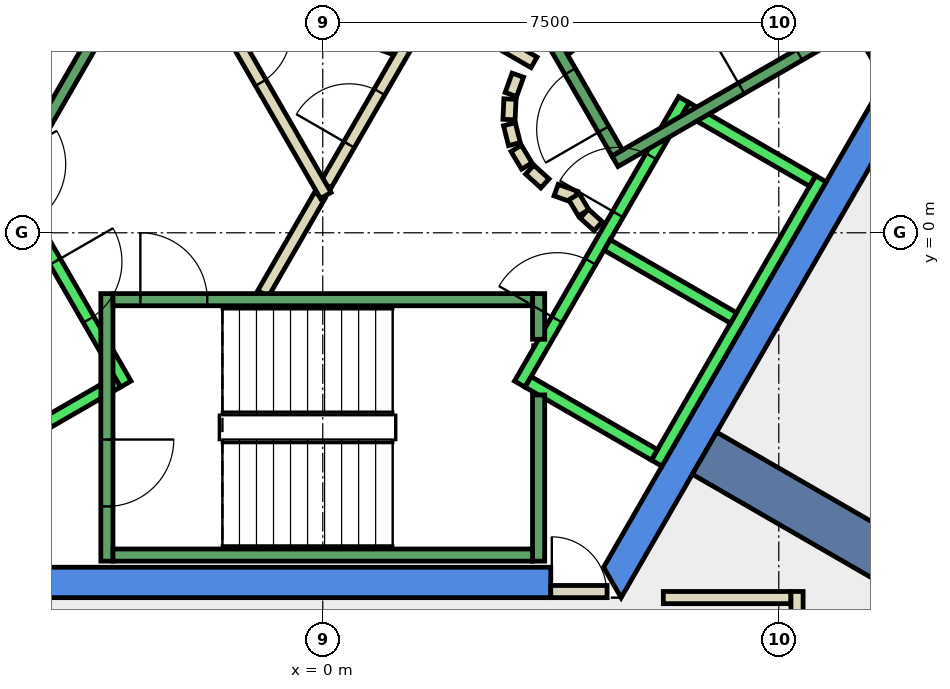
"""IFC4 building model, lengths in metres.
Left out: names, types, materials, properties, quantities, classifications, styles, units other than length and angle.
Written with IfcOpenShell. Run it as: python <this file> out.ifc"""

import sys

from ifc_helpers import new_model, si_unit, direction, frame, frame_2d, origin, place, context, subcontext, project, spatial, polyline, rectangle, outline, extrude, element, fill, save


model = new_model("IFC4")
c1 = context("Model", 3, precision=1e-05, world=origin(), true_north=direction((0.0, 1.0)))
c2 = subcontext(c1, "Body", "Model", "MODEL_VIEW")
j1 = project(units=[si_unit("LENGTHUNIT", "METRE"), si_unit("PLANEANGLEUNIT", "RADIAN")], contexts=[c1])
p1 = place(None, origin())
s1 = spatial("IfcSite", under=j1, at=p1, CompositionType="ELEMENT")
p2 = place(p1, origin())
s2 = spatial("IfcBuilding", under=s1, at=p2, CompositionType="ELEMENT")
p3 = place(p2, frame((0.0, 0.0, 318.8)))
s3 = spatial("IfcBuildingStorey", under=s2, at=p3, CompositionType="ELEMENT", Elevation=318.8)
p4 = place(p3, frame((0.0, 0.0, -0.34)))
e1 = element("IfcWall", 1, at=p4, inside=s3, PredefinedType="SHEAR", context=c2, shape_type="SweptSolid", body=[
    extrude(outline(polyline([(5.486, 9.998), (5.053, 9.748), (9.238, 2.5), (9.815, 2.5), (5.486, 9.998)])), origin(), (0.0, 0.0, 1.0), 3.6),
])
p5 = place(p3, frame((0.0, 0.0, -0.34)))
e2 = element("IfcWall", 2, at=p5, inside=s3, PredefinedType="SHEAR", context=c2, shape_type="SweptSolid", body=[
    extrude(outline(polyline([(3.75, -6.0), (3.75, -5.5), (-4.619, -5.5), (-4.907, -6.0), (3.75, -6.0)])), origin(), (0.0, 0.0, 1.0), 3.6),
])
p6 = place(p3, frame((0.0, 0.0, -0.34)))
e3 = element("IfcWall", 3, at=p6, inside=s3, PredefinedType="SHEAR", context=c2, shape_type="SweptSolid", body=[
    extrude(outline(polyline([(4.907, -6.0), (9.815, 2.5), (9.238, 2.5), (4.619, -5.5), (4.907, -6.0)])), origin(), (0.0, 0.0, 1.0), 3.6),
])
p7 = place(p3, frame((6.279, -3.625, -0.34), z_axis=(0.0, 0.0, 1.0), x_axis=(0.866017533419, -0.500013631625, 0.0)))
e4 = element("IfcWall", 4, at=p7, inside=s3, PredefinedType="SHEAR", context=c2, shape_type="SweptSolid", body=[
    extrude(rectangle(XDim=9.0, YDim=0.8, at=frame_2d((4.5, 0.0))), origin(), (0.0, 0.0, 1.0), 3.6),
])
p8 = place(p3, frame((-0.82, 3.756, 0.0), z_axis=(0.0, 0.0, 1.0), x_axis=(0.939740098492, -0.34188967122, 0.0)))
e5 = element("IfcWall", 5, at=p8, inside=s3, PredefinedType="PARTITIONING", context=c2, shape_type="SweptSolid", body=[
    extrude(rectangle(XDim=2.273, YDim=0.2, at=frame_2d((1.136, 0.0))), origin(), (0.0, 0.0, 1.0), 3.26),
])
p9 = place(p3, frame((-0.982, -1.0, 0.0), z_axis=(0.0, 0.0, 1.0), x_axis=(0.50024047865, 0.865886518847, 0.0)))
e6 = element("IfcWall", 6, at=p9, inside=s3, PredefinedType="PARTITIONING", context=c2, shape_type="SweptSolid", body=[
    extrude(rectangle(XDim=1.863, YDim=0.2, at=frame_2d((0.931, 0.0))), origin(), (0.0, 0.0, 1.0), 3.26),
])
p10 = place(p3, frame((0.05, 0.787, 0.0), z_axis=(0.0, 0.0, 1.0), x_axis=(0.500070457302, 0.865984721421, 0.0)))
e7 = element("IfcWall", 7, at=p10, inside=s3, PredefinedType="PARTITIONING", context=c2, shape_type="SweptSolid", body=[
    extrude(rectangle(XDim=2.631, YDim=0.2, at=frame_2d((1.316, 0.0))), origin(), (0.0, 0.0, 1.0), 3.26),
])
p11 = place(p10, frame((0.766, 0.0, 0.0)))
e8 = element("IfcOpeningElement", 8, at=p11, cuts=e7, PredefinedType="OPENING", context=c2, shape_type="SweptSolid", body=[
    extrude(rectangle(XDim=1.0, YDim=2.1, at=frame_2d((0.5, 1.05))), frame((0.0, 0.11, 0.0), z_axis=(0.0, -1.0, 0.0), x_axis=(1.0, 0.0, 0.0)), (0.0, 0.0, 1.0), 0.22),
])
p12 = place(p3, frame((1.751, 3.798, 0.0), z_axis=(0.0, 0.0, 1.0), x_axis=(0.866091650241, -0.499885240213, 0.0)))
e9 = element("IfcWall", 9, at=p12, inside=s3, PredefinedType="PARTITIONING", context=c2, shape_type="SweptSolid", body=[
    extrude(rectangle(XDim=1.991, YDim=0.2, at=frame_2d((0.995, 0.0))), origin(), (0.0, 0.0, 1.0), 3.26),
])
p13 = place(p3, frame((3.208, 2.592, 0.0), z_axis=(0.0, 0.0, 1.0), x_axis=(-0.337388820924, -0.941365382578, 0.0)))
e10 = element("IfcWall", 10, at=p13, inside=s3, PredefinedType="PARTITIONING", context=c2, shape_type="SweptSolid", body=[
    extrude(rectangle(XDim=0.338, YDim=0.2, at=frame_2d((0.169, 0.0))), origin(), (0.0, 0.0, 1.0), 3.26),
])
p14 = place(p3, frame((3.079, 2.199, 0.0), z_axis=(0.0, 0.0, 1.0), x_axis=(-0.047771483479, -0.998858290933, 0.0)))
e11 = element("IfcWall", 11, at=p14, inside=s3, PredefinedType="PARTITIONING", context=c2, shape_type="SweptSolid", body=[
    extrude(rectangle(XDim=0.337, YDim=0.2, at=frame_2d((0.169, 0.0))), origin(), (0.0, 0.0, 1.0), 3.26),
])
p15 = place(p3, frame((3.07, 1.786, 0.0), z_axis=(0.0, 0.0, 1.0), x_axis=(0.242705583207, -0.970099994784, 0.0)))
e12 = element("IfcWall", 12, at=p15, inside=s3, PredefinedType="PARTITIONING", context=c2, shape_type="SweptSolid", body=[
    extrude(rectangle(XDim=0.338, YDim=0.2, at=frame_2d((0.169, 0.0))), origin(), (0.0, 0.0, 1.0), 3.26),
])
for number, where, z_axis, x_axis in (
    (13, (3.182, 1.388, 0.0), (0.0, 0.0, 1.0), (0.512, -0.859, 0.0)),
    (14, (3.404, 1.039, 0.0), (0.0, 0.0, 1.0), (0.74, -0.672, 0.0)),
):
    element("IfcWall", number, at=place(p3, frame(where, z_axis=z_axis, x_axis=x_axis)), inside=s3, PredefinedType="PARTITIONING", context=c2, shape_type="SweptSolid", body=[
        extrude(rectangle(XDim=0.338, YDim=0.2, at=frame_2d((0.169, 0.0))), origin(), (0.0, 0.0, 1.0), 3.26),
    ])
p16 = place(p3, frame((3.838, 0.702, 0.0), z_axis=(0.0, 0.0, 1.0), x_axis=(0.941035081519, -0.338308993895, 0.0)))
e15 = element("IfcWall", 15, at=p16, inside=s3, PredefinedType="PARTITIONING", context=c2, shape_type="SweptSolid", body=[
    extrude(rectangle(XDim=0.337, YDim=0.2, at=frame_2d((0.168, 0.0))), origin(), (0.0, 0.0, 1.0), 3.26),
])
p17 = place(p3, frame((4.132, 0.593, 0.0), z_axis=(0.0, 0.0, 1.0), x_axis=(0.513561617048, -0.858052717201, 0.0)))
e16 = element("IfcWall", 16, at=p17, inside=s3, PredefinedType="PARTITIONING", context=c2, shape_type="SweptSolid", body=[
    extrude(rectangle(XDim=0.308, YDim=0.2, at=frame_2d((0.154, 0.0))), origin(), (0.0, 0.0, 1.0), 3.26),
])
p18 = place(p3, frame((4.301, 0.315, 0.0), z_axis=(0.0, 0.0, 1.0), x_axis=(0.741798017506, -0.670623367639, 0.0)))
e17 = element("IfcWall", 17, at=p18, inside=s3, PredefinedType="PARTITIONING", context=c2, shape_type="SweptSolid", body=[
    extrude(rectangle(XDim=0.309, YDim=0.2, at=frame_2d((0.154, 0.0))), origin(), (0.0, 0.0, 1.0), 3.26),
])
p19 = place(p3, frame((-2.54, 5.1, 0.0), z_axis=(0.0, 0.0, 1.0), x_axis=(0.499925051871, -0.866068670783, 0.0)))
e18 = element("IfcWall", 18, at=p19, inside=s3, PredefinedType="PARTITIONING", context=c2, shape_type="SweptSolid", body=[
    extrude(rectangle(XDim=5.181, YDim=0.2, at=frame_2d((2.59, 0.0))), origin(), (0.0, 0.0, 1.0), 3.26),
])
p20 = place(p19, frame((2.04, 0.0, 0.0)))
e19 = element("IfcOpeningElement", 19, at=p20, cuts=e18, PredefinedType="OPENING", context=c2, shape_type="SweptSolid", body=[
    extrude(rectangle(XDim=1.0, YDim=2.1, at=frame_2d((0.5, 1.05))), frame((0.0, 0.11, 0.0), z_axis=(0.0, -1.0, 0.0), x_axis=(1.0, 0.0, 0.0)), (0.0, 0.0, 1.0), 0.22),
])
p21 = place(p3, frame((5.601, -5.999, 0.0), z_axis=(0.0, 0.0, 1.0), x_axis=(1.0, 0.0, 0.0)))
e20 = element("IfcWall", 20, at=p21, inside=s3, PredefinedType="PARTITIONING", context=c2, shape_type="SweptSolid", body=[
    extrude(rectangle(XDim=2.099, YDim=0.2, at=frame_2d((1.049, 0.0))), origin(), (0.0, 0.0, 1.0), 3.26),
])
p22 = place(p3, frame((7.8, -5.899, 0.0), z_axis=(0.0, 0.0, 1.0), x_axis=(0.0, -1.0, 0.0)))
e21 = element("IfcWall", 21, at=p22, inside=s3, PredefinedType="PARTITIONING", context=c2, shape_type="SweptSolid", body=[
    extrude(rectangle(XDim=5.725, YDim=0.2, at=frame_2d((2.863, 0.0))), origin(), (0.0, 0.0, 1.0), 3.26),
])
p23 = place(p3, frame((3.75, -5.9, 0.0), z_axis=(0.0, 0.0, 1.0), x_axis=(1.0, 0.0, 0.0)))
e22 = element("IfcWall", 22, at=p23, inside=s3, PredefinedType="PARTITIONING", context=c2, shape_type="SweptSolid", body=[
    extrude(rectangle(XDim=0.926, YDim=0.2, at=frame_2d((0.463, 0.0))), origin(), (0.0, 0.0, 1.0), 2.4),
])
p24 = place(p23, frame((0.017, 0.0, 0.0)))
e23 = element("IfcOpeningElement", 23, at=p24, cuts=e22, PredefinedType="OPENING", context=c2, shape_type="SweptSolid", body=[
    extrude(rectangle(XDim=0.9, YDim=2.1, at=frame_2d((0.45, 1.05))), frame((0.0, 0.11, 0.0), z_axis=(0.0, -1.0, 0.0), x_axis=(1.0, 0.0, 0.0)), (0.0, 0.0, 1.0), 0.22),
])
p25 = place(p3, frame((-5.94, 2.188, 0.0), z_axis=(0.0, 0.0, 1.0), x_axis=(0.500034260056, -0.866005622828, 0.0)))
e24 = element("IfcWall", 24, at=p25, inside=s3, PredefinedType="STANDARD", context=c2, shape_type="SweptSolid", body=[
    extrude(rectangle(XDim=5.399, YDim=0.2, at=frame_2d((2.7, 0.0))), origin(), (0.0, 0.0, 1.0), 3.26),
])
p26 = place(p25, frame((3.075, 0.0, 0.0)))
e25 = element("IfcOpeningElement", 25, at=p26, cuts=e24, PredefinedType="OPENING", context=c2, shape_type="SweptSolid", body=[
    extrude(rectangle(XDim=1.1, YDim=2.1, at=frame_2d((0.55, 1.05))), frame((0.0, 0.11, 0.0), z_axis=(0.0, -1.0, 0.0), x_axis=(1.0, 0.0, 0.0)), (0.0, 0.0, 1.0), 0.22),
])
p27 = place(p25, frame((1.225, 0.0, 0.0)))
e26 = element("IfcOpeningElement", 26, at=p27, cuts=e24, PredefinedType="OPENING", context=c2, shape_type="SweptSolid", body=[
    extrude(rectangle(XDim=1.1, YDim=2.1, at=frame_2d((0.55, 1.05))), frame((0.0, 0.11, 0.0), z_axis=(0.0, -1.0, 0.0), x_axis=(1.0, 0.0, 0.0)), (0.0, 0.0, 1.0), 0.22),
])
p28 = place(p3, frame((-3.377, -2.452, 0.0), z_axis=(0.0, 0.0, 1.0), x_axis=(-0.865955154139, -0.50012165622, 0.0)))
e27 = element("IfcWall", 27, at=p28, inside=s3, PredefinedType="STANDARD", context=c2, shape_type="SweptSolid", body=[
    extrude(rectangle(XDim=2.4, YDim=0.2, at=frame_2d((1.2, 0.0))), origin(), (0.0, 0.0, 1.0), 3.26),
])
p29 = place(p3, frame((3.24, -2.488, 0.0), z_axis=(0.0, 0.0, 1.0), x_axis=(0.500034260056, 0.866005622828, 0.0)))
e28 = element("IfcWall", 28, at=p29, inside=s3, PredefinedType="STANDARD", context=c2, shape_type="SweptSolid", body=[
    extrude(rectangle(XDim=5.399, YDim=0.2, at=frame_2d((2.7, 0.0))), origin(), (0.0, 0.0, 1.0), 3.26),
])
p30 = place(p29, frame((3.225, 0.0, 0.0)))
e29 = element("IfcOpeningElement", 29, at=p30, cuts=e28, PredefinedType="OPENING", context=c2, shape_type="SweptSolid", body=[
    extrude(rectangle(XDim=1.1, YDim=2.1, at=frame_2d((0.55, 1.05))), frame((0.0, 0.11, 0.0), z_axis=(0.0, -1.0, 0.0), x_axis=(1.0, 0.0, 0.0)), (0.0, 0.0, 1.0), 0.22),
])
p31 = place(p29, frame((1.225, 0.0, 0.0)))
e30 = element("IfcOpeningElement", 30, at=p31, cuts=e28, PredefinedType="OPENING", context=c2, shape_type="SweptSolid", body=[
    extrude(rectangle(XDim=1.1, YDim=2.1, at=frame_2d((0.55, 1.05))), frame((0.0, 0.11, 0.0), z_axis=(0.0, -1.0, 0.0), x_axis=(1.0, 0.0, 0.0)), (0.0, 0.0, 1.0), 0.22),
])
p32 = place(p3, frame((5.492, -3.788, 0.0), z_axis=(0.0, 0.0, 1.0), x_axis=(0.500034260056, 0.866005622828, 0.0)))
e31 = element("IfcWall", 31, at=p32, inside=s3, PredefinedType="STANDARD", context=c2, shape_type="SweptSolid", body=[
    extrude(rectangle(XDim=5.399, YDim=0.2, at=frame_2d((2.7, 0.0))), origin(), (0.0, 0.0, 1.0), 3.26),
])
p33 = place(p3, frame((3.377, -2.452, 0.0), z_axis=(0.0, 0.0, 1.0), x_axis=(0.865955154139, -0.50012165622, 0.0)))
e32 = element("IfcWall", 32, at=p33, inside=s3, PredefinedType="STANDARD", context=c2, shape_type="SweptSolid", body=[
    extrude(rectangle(XDim=2.4, YDim=0.2, at=frame_2d((1.2, 0.0))), origin(), (0.0, 0.0, 1.0), 3.26),
])
for number, where, z_axis, x_axis in (
    (33, (4.677, -0.2, 0.0), (0.0, 0.0, 1.0), (0.866, -0.5, 0.0)),
    (34, (5.977, 2.052, 0.0), (0.0, 0.0, 1.0), (0.866, -0.5, 0.0)),
):
    element("IfcWall", number, at=place(p3, frame(where, z_axis=z_axis, x_axis=x_axis)), inside=s3, PredefinedType="STANDARD", context=c2, shape_type="SweptSolid", body=[
        extrude(rectangle(XDim=2.399, YDim=0.2, at=frame_2d((1.2, 0.0))), origin(), (0.0, 0.0, 1.0), 3.26),
    ])
p34 = place(p3, frame((-3.55, -1.0, 0.0), z_axis=(0.0, 0.0, 1.0), x_axis=(0.0, -1.0, 0.0)))
e35 = element("IfcWall", 35, at=p34, inside=s3, PredefinedType="STANDARD", context=c2, shape_type="SweptSolid", body=[
    extrude(rectangle(XDim=4.4, YDim=0.2, at=frame_2d((2.2, 0.0))), origin(), (0.0, 0.0, 1.0), 3.26),
])
p35 = place(p34, frame((2.4, 0.0, 0.0)))
e36 = element("IfcOpeningElement", 36, at=p35, cuts=e35, PredefinedType="OPENING", context=c2, shape_type="SweptSolid", body=[
    extrude(rectangle(XDim=1.1, YDim=2.2, at=frame_2d((0.55, 1.1))), frame((0.0, 0.11, 0.0), z_axis=(0.0, -1.0, 0.0), x_axis=(1.0, 0.0, 0.0)), (0.0, 0.0, 1.0), 0.22),
])
p36 = place(p3, frame((3.55, -2.667, 0.0), z_axis=(0.0, 0.0, 1.0), x_axis=(0.0, -1.0, 0.0)))
e37 = element("IfcWall", 37, at=p36, inside=s3, PredefinedType="STANDARD", context=c2, shape_type="SweptSolid", body=[
    extrude(rectangle(XDim=2.733, YDim=0.2, at=frame_2d((1.366, 0.0))), origin(), (0.0, 0.0, 1.0), 3.26),
])
p37 = place(p3, frame((3.55, -1.0, 0.0), z_axis=(0.0, 0.0, 1.0), x_axis=(0.0, -1.0, 0.0)))
e38 = element("IfcWall", 38, at=p37, inside=s3, PredefinedType="STANDARD", context=c2, shape_type="SweptSolid", body=[
    extrude(rectangle(XDim=0.751, YDim=0.2, at=frame_2d((0.375, 0.0))), origin(), (0.0, 0.0, 1.0), 3.26),
])
p38 = place(p3, frame((-3.45, -1.1, 0.0), z_axis=(0.0, 0.0, 1.0), x_axis=(1.0, 0.0, 0.0)))
e39 = element("IfcWall", 39, at=p38, inside=s3, PredefinedType="STANDARD", context=c2, shape_type="SweptSolid", body=[
    extrude(rectangle(XDim=6.9, YDim=0.2, at=frame_2d((3.45, 0.0))), origin(), (0.0, 0.0, 1.0), 3.26),
])
p39 = place(p38, frame((0.45, 0.0, 0.0)))
e40 = element("IfcOpeningElement", 40, at=p39, cuts=e39, PredefinedType="OPENING", context=c2, shape_type="SweptSolid", body=[
    extrude(rectangle(XDim=1.1, YDim=2.2, at=frame_2d((0.55, 1.1))), frame((0.0, 0.11, 0.0), z_axis=(0.0, -1.0, 0.0), x_axis=(1.0, 0.0, 0.0)), (0.0, 0.0, 1.0), 0.22),
])
p40 = place(p3, frame((-3.45, -5.3, 0.0), z_axis=(0.0, 0.0, 1.0), x_axis=(1.0, 0.0, 0.0)))
e41 = element("IfcWall", 41, at=p40, inside=s3, PredefinedType="STANDARD", context=c2, shape_type="SweptSolid", body=[
    extrude(rectangle(XDim=6.9, YDim=0.2, at=frame_2d((3.45, 0.0))), origin(), (0.0, 0.0, 1.0), 3.26),
])
p41 = place(p3, frame((4.806, 1.176, 0.0), z_axis=(0.0, 0.0, 1.0), x_axis=(0.866059941101, 0.499940174841, 0.0)))
e42 = element("IfcWall", 42, at=p41, inside=s3, PredefinedType="STANDARD", context=c2, shape_type="SweptSolid", body=[
    extrude(rectangle(XDim=4.4, YDim=0.2, at=frame_2d((2.2, 0.0))), origin(), (0.0, 0.0, 1.0), 3.26),
])
p42 = place(p41, frame((2.4, 0.0, 0.0)))
e43 = element("IfcOpeningElement", 43, at=p42, cuts=e42, PredefinedType="OPENING", context=c2, shape_type="SweptSolid", body=[
    extrude(rectangle(XDim=1.1, YDim=2.2, at=frame_2d((0.55, 1.1))), frame((0.0, 0.11, 0.0), z_axis=(0.0, -1.0, 0.0), x_axis=(1.0, 0.0, 0.0)), (0.0, 0.0, 1.0), 0.22),
])
p43 = place(p3, frame((4.843, 1.312, 0.0), z_axis=(0.0, 0.0, 1.0), x_axis=(-0.499963383562, 0.866046543262, 0.0)))
e44 = element("IfcWall", 44, at=p43, inside=s3, PredefinedType="STANDARD", context=c2, shape_type="SweptSolid", body=[
    extrude(rectangle(XDim=6.9, YDim=0.2, at=frame_2d((3.45, 0.0))), origin(), (0.0, 0.0, 1.0), 3.26),
])
p44 = place(p43, frame((0.45, 0.0, 0.0)))
e45 = element("IfcOpeningElement", 45, at=p44, cuts=e44, PredefinedType="OPENING", context=c2, shape_type="SweptSolid", body=[
    extrude(rectangle(XDim=1.1, YDim=2.2, at=frame_2d((0.55, 1.1))), frame((0.0, 0.11, 0.0), z_axis=(0.0, -1.0, 0.0), x_axis=(1.0, 0.0, 0.0)), (0.0, 0.0, 1.0), 0.22),
])
p45 = place(p3, frame((-1.393, 7.288, 0.0), z_axis=(0.0, 0.0, 1.0), x_axis=(-0.499963383562, -0.866046543262, 0.0)))
e46 = element("IfcWall", 46, at=p45, inside=s3, PredefinedType="STANDARD", context=c2, shape_type="SweptSolid", body=[
    extrude(rectangle(XDim=6.9, YDim=0.2, at=frame_2d((3.45, 0.0))), origin(), (0.0, 0.0, 1.0), 3.26),
])
p46 = place(p45, frame((0.45, 0.0, 0.0)))
e47 = element("IfcOpeningElement", 47, at=p46, cuts=e46, PredefinedType="OPENING", context=c2, shape_type="SweptSolid", body=[
    extrude(rectangle(XDim=1.1, YDim=2.2, at=frame_2d((0.55, 1.1))), frame((0.0, 0.11, 0.0), z_axis=(0.0, -1.0, 0.0), x_axis=(1.0, 0.0, 0.0)), (0.0, 0.0, 1.0), 0.22),
])
p47 = place(p11, origin())
e48 = element("IfcDoor", 48, at=p47, inside=s3, OperationType="SINGLE_SWING_RIGHT", PredefinedType="DOOR", context=c2, shape_type="SweptSolid", body=[
    extrude(rectangle(XDim=1.0, YDim=2.1, at=frame_2d((0.5, 1.05))), frame((0.0, 0.025, 0.0), z_axis=(0.0, -1.0, 0.0), x_axis=(1.0, 0.0, 0.0)), (0.0, 0.0, 1.0), 0.05),
])
fill(e8, e48)
p48 = place(p20, origin())
e49 = element("IfcDoor", 49, at=p48, inside=s3, OperationType="SINGLE_SWING_RIGHT", PredefinedType="DOOR", context=c2, shape_type="SweptSolid", body=[
    extrude(rectangle(XDim=1.0, YDim=2.1, at=frame_2d((0.5, 1.05))), frame((0.0, 0.025, 0.0), z_axis=(0.0, -1.0, 0.0), x_axis=(1.0, 0.0, 0.0)), (0.0, 0.0, 1.0), 0.05),
])
fill(e19, e49)
p49 = place(p24, origin())
e50 = element("IfcDoor", 50, at=p49, inside=s3, OperationType="SINGLE_SWING_LEFT", PredefinedType="DOOR", context=c2, shape_type="SweptSolid", body=[
    extrude(rectangle(XDim=0.9, YDim=2.1, at=frame_2d((0.45, 1.05))), frame((0.0, 0.025, 0.0), z_axis=(0.0, -1.0, 0.0), x_axis=(1.0, 0.0, 0.0)), (0.0, 0.0, 1.0), 0.05),
])
fill(e23, e50)
p50 = place(p30, origin())
e51 = element("IfcDoor", 51, at=p50, inside=s3, OperationType="SLIDING_TO_LEFT", PredefinedType="DOOR", context=c2, shape_type="SweptSolid", body=[
    extrude(rectangle(XDim=1.1, YDim=2.1, at=frame_2d((0.55, 1.05))), frame((0.0, 0.025, 0.0), z_axis=(0.0, -1.0, 0.0), x_axis=(1.0, 0.0, 0.0)), (0.0, 0.0, 1.0), 0.05),
])
fill(e29, e51)
p51 = place(p26, origin())
e52 = element("IfcDoor", 52, at=p51, inside=s3, OperationType="SLIDING_TO_LEFT", PredefinedType="DOOR", context=c2, shape_type="SweptSolid", body=[
    extrude(rectangle(XDim=1.1, YDim=2.1, at=frame_2d((0.55, 1.05))), frame((0.0, 0.025, 0.0), z_axis=(0.0, -1.0, 0.0), x_axis=(1.0, 0.0, 0.0)), (0.0, 0.0, 1.0), 0.05),
])
fill(e25, e52)
p52 = place(p31, origin())
e53 = element("IfcDoor", 53, at=p52, inside=s3, OperationType="SLIDING_TO_LEFT", PredefinedType="DOOR", context=c2, shape_type="SweptSolid", body=[
    extrude(rectangle(XDim=1.1, YDim=2.1, at=frame_2d((0.55, 1.05))), frame((0.0, 0.025, 0.0), z_axis=(0.0, -1.0, 0.0), x_axis=(1.0, 0.0, 0.0)), (0.0, 0.0, 1.0), 0.05),
])
fill(e30, e53)
p53 = place(p39, origin())
e54 = element("IfcDoor", 54, at=p53, inside=s3, OperationType="SINGLE_SWING_LEFT", PredefinedType="DOOR", context=c2, shape_type="SweptSolid", body=[
    extrude(rectangle(XDim=1.1, YDim=2.2, at=frame_2d((0.55, 1.1))), frame((0.0, 0.025, 0.0), z_axis=(0.0, -1.0, 0.0), x_axis=(1.0, 0.0, 0.0)), (0.0, 0.0, 1.0), 0.05),
])
fill(e40, e54)
p54 = place(p35, origin())
e55 = element("IfcDoor", 55, at=p54, inside=s3, OperationType="SINGLE_SWING_LEFT", PredefinedType="DOOR", context=c2, shape_type="SweptSolid", body=[
    extrude(rectangle(XDim=1.1, YDim=2.2, at=frame_2d((0.55, 1.1))), frame((0.0, 0.025, 0.0), z_axis=(0.0, -1.0, 0.0), x_axis=(1.0, 0.0, 0.0)), (0.0, 0.0, 1.0), 0.05),
])
fill(e36, e55)
p55 = place(p44, origin())
e56 = element("IfcDoor", 56, at=p55, inside=s3, OperationType="SINGLE_SWING_LEFT", PredefinedType="DOOR", context=c2, shape_type="SweptSolid", body=[
    extrude(rectangle(XDim=1.1, YDim=2.2, at=frame_2d((0.55, 1.1))), frame((0.0, 0.025, 0.0), z_axis=(0.0, -1.0, 0.0), x_axis=(1.0, 0.0, 0.0)), (0.0, 0.0, 1.0), 0.05),
])
fill(e45, e56)
p56 = place(p42, origin())
e57 = element("IfcDoor", 57, at=p56, inside=s3, OperationType="SINGLE_SWING_LEFT", PredefinedType="DOOR", context=c2, shape_type="SweptSolid", body=[
    extrude(rectangle(XDim=1.1, YDim=2.2, at=frame_2d((0.55, 1.1))), frame((0.0, 0.025, 0.0), z_axis=(0.0, -1.0, 0.0), x_axis=(1.0, 0.0, 0.0)), (0.0, 0.0, 1.0), 0.05),
])
fill(e43, e57)
save(model, sys.argv[1])
